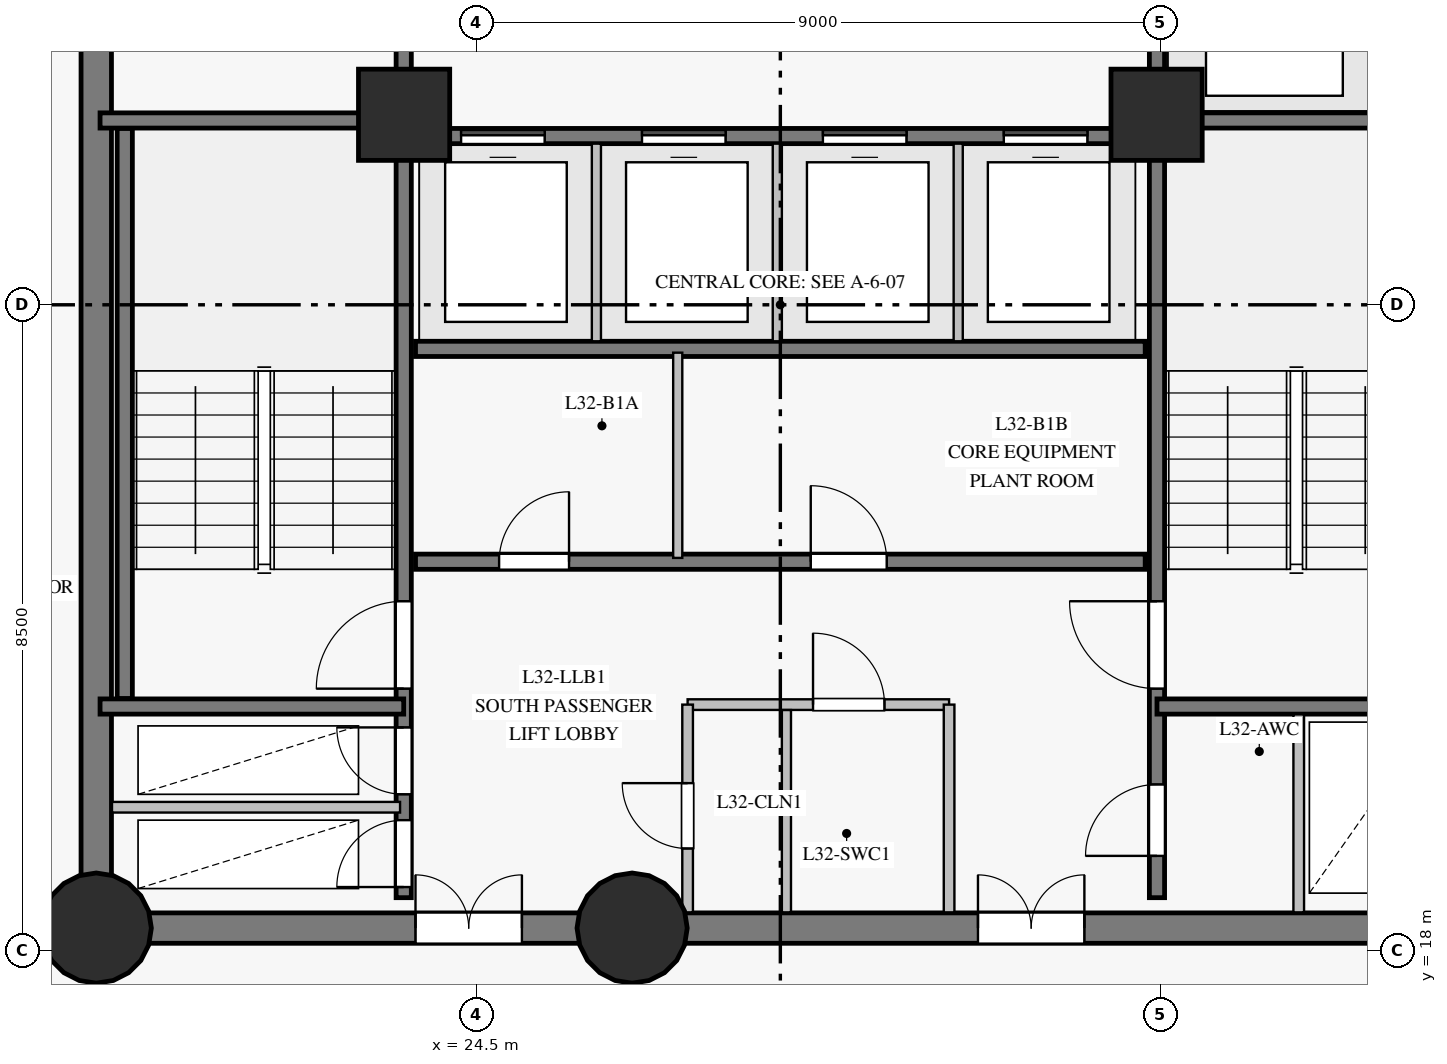
"""IFC4 building model, lengths in metres.
Left out: names, types, materials, properties, quantities, classifications, styles, units other than length and angle.
Written with IfcOpenShell. Run it as: python <this file> out.ifc"""

import sys

from ifc_helpers import new_model, si_unit, direction, frame, frame_2d, origin, origin_with_axes, origin_2d, place, context, subcontext, project, spatial, rectangle, circle, extrude, source, transform, mapped, element, fill, save


model = new_model("IFC4")
c1 = context("Model", 3, precision=1e-05, world=origin(), true_north=direction((0.0, 1.0)))
c2 = subcontext(c1, "Body", "Model", "MODEL_VIEW")
j1 = project(units=[si_unit("LENGTHUNIT", "METRE"), si_unit("PLANEANGLEUNIT", "RADIAN")], contexts=[c1])
p1 = place(None, origin())
s1 = spatial("IfcSite", under=j1, at=p1, CompositionType="ELEMENT")
p2 = place(p1, origin())
s2 = spatial("IfcBuilding", under=s1, at=p2, CompositionType="ELEMENT")
p3 = place(p2, frame((0.0, 0.0, 117.55)))
s3 = spatial("IfcBuildingStorey", under=s2, at=p3, CompositionType="ELEMENT", Elevation=117.55)
p4 = place(p3, frame((19.5, 18.3, 0.0), z_axis=(0.0, 0.0, 1.0), x_axis=(1.0, 0.0, 0.0)))
e1 = element("IfcWall", 1, at=p4, inside=s3, PredefinedType="SHEAR", context=c2, shape_type="SweptSolid", body=[
    extrude(rectangle(XDim=7.05, YDim=0.4, at=frame_2d((3.525, 0.0))), origin(), (0.0, 0.0, 1.0), 2.825),
])
p5 = place(p4, frame((4.2, 0.0, 0.0)))
e2 = element("IfcOpeningElement", 2, at=p5, cuts=e1, PredefinedType="OPENING", context=c2, shape_type="SweptSolid", body=[
    extrude(rectangle(XDim=1.4, YDim=2.2, at=frame_2d((0.7, 1.1))), frame((0.0, 0.21, 0.0), z_axis=(0.0, -1.0, 0.0), x_axis=(1.0, 0.0, 0.0)), (0.0, 0.0, 1.0), 0.42),
])
p6 = place(p3, frame((26.55, 18.3, 0.0), z_axis=(0.0, 0.0, 1.0), x_axis=(1.0, 0.0, 0.0)))
e3 = element("IfcWall", 3, at=p6, inside=s3, PredefinedType="SHEAR", context=c2, shape_type="SweptSolid", body=[
    extrude(rectangle(XDim=10.95, YDim=0.4, at=frame_2d((5.475, 0.0))), origin(), (0.0, 0.0, 1.0), 2.825),
])
p7 = place(p6, frame((4.55, 0.0, 0.0)))
e4 = element("IfcOpeningElement", 4, at=p7, cuts=e3, PredefinedType="OPENING", context=c2, shape_type="SweptSolid", body=[
    extrude(rectangle(XDim=1.4, YDim=2.2, at=frame_2d((0.7, 1.1))), frame((0.0, 0.21, 0.0), z_axis=(0.0, -1.0, 0.0), x_axis=(1.0, 0.0, 0.0)), (0.0, 0.0, 1.0), 0.42),
])
p8 = place(p3, frame((19.5, 34.7, 0.0), z_axis=(0.0, 0.0, 1.0), x_axis=(0.0, -1.0, 0.0)))
e5 = element("IfcWall", 5, at=p8, inside=s3, PredefinedType="SHEAR", context=c2, shape_type="SweptSolid", body=[
    extrude(rectangle(XDim=16.4, YDim=0.4, at=frame_2d((8.2, 0.0))), origin(), (0.0, 0.0, 1.0), 2.825),
])
p9 = place(p8, frame((3.1, 0.0, 0.0)))
e6 = element("IfcOpeningElement", 6, at=p9, cuts=e5, PredefinedType="OPENING", context=c2, shape_type="SweptSolid", body=[
    extrude(rectangle(XDim=1.1, YDim=2.15, at=frame_2d((0.55, 1.075))), frame((0.0, 0.21, 0.0), z_axis=(0.0, -1.0, 0.0), x_axis=(1.0, 0.0, 0.0)), (0.0, 0.0, 1.0), 0.42),
])
m1 = source(origin_with_axes(), c2, "Body", "SweptSolid", [
    extrude(circle(Radius=0.725, at=origin_2d()), origin(), (0.0, 0.0, 1.0), 3.05),
])
for number, where, z_axis, x_axis in (
    (7, (19.5, 18.3, 0.0), (0.0, 0.0, 1.0), (1.0, 0.0, 0.0)),
    (8, (26.55, 18.3, 0.0), (0.0, 0.0, 1.0), (1.0, 0.0, 0.0)),
):
    element("IfcColumn", number, at=place(p3, frame(where, z_axis=z_axis, x_axis=x_axis)), inside=s3, PredefinedType="COLUMN", context=c2, shape_type="MappedRepresentation", body=[
        mapped(m1, transform((0.0, 0.0, 0.0), scale=1.0)),
    ])
m2 = source(origin_with_axes(), c2, "Body", "SweptSolid", [
    extrude(rectangle(XDim=1.2, YDim=1.2, at=origin_2d()), origin(), (0.0, 0.0, 1.0), 3.05),
])
for number, where, z_axis, x_axis in (
    (9, (23.55, 29.0, 0.0), (0.0, 0.0, 1.0), (1.0, 0.0, 0.0)),
    (10, (33.45, 29.0, 0.0), (0.0, 0.0, 1.0), (1.0, 0.0, 0.0)),
):
    element("IfcColumn", number, at=place(p3, frame(where, z_axis=z_axis, x_axis=x_axis)), inside=s3, PredefinedType="COLUMN", context=c2, shape_type="MappedRepresentation", body=[
        mapped(m2, transform((0.0, 0.0, 0.0), scale=1.0)),
    ])
p10 = place(p3, frame((23.545, 18.7, 0.0), z_axis=(0.0, 0.0, 1.0), x_axis=(0.0, 1.0, 0.0)))
e11 = element("IfcWall", 11, at=p10, inside=s3, PredefinedType="SHEAR", context=c2, shape_type="SweptSolid", body=[
    extrude(rectangle(XDim=15.6, YDim=0.2, at=frame_2d((7.8, 0.0))), origin(), (0.0, 0.0, 1.0), 2.825),
])
p11 = place(p10, frame((2.75, 0.0, 0.0)))
e12 = element("IfcOpeningElement", 12, at=p11, cuts=e11, PredefinedType="OPENING", context=c2, shape_type="SweptSolid", body=[
    extrude(rectangle(XDim=1.15, YDim=2.15, at=frame_2d((0.575, 1.075))), frame((0.0, 0.11, 0.0), z_axis=(0.0, -1.0, 0.0), x_axis=(1.0, 0.0, 0.0)), (0.0, 0.0, 1.0), 0.22),
])
p12 = place(p10, frame((0.14, 0.0, 0.0)))
e13 = element("IfcOpeningElement", 13, at=p12, cuts=e11, PredefinedType="OPENING", context=c2, shape_type="SweptSolid", body=[
    extrude(rectangle(XDim=0.88, YDim=2.1, at=frame_2d((0.44, 1.05))), frame((0.0, 0.11, 0.0), z_axis=(0.0, -1.0, 0.0), x_axis=(1.0, 0.0, 0.0)), (0.0, 0.0, 1.0), 0.22),
])
p13 = place(p10, frame((1.36, 0.0, 0.0)))
e14 = element("IfcOpeningElement", 14, at=p13, cuts=e11, PredefinedType="OPENING", context=c2, shape_type="SweptSolid", body=[
    extrude(rectangle(XDim=0.88, YDim=2.1, at=frame_2d((0.44, 1.05))), frame((0.0, 0.11, 0.0), z_axis=(0.0, -1.0, 0.0), x_axis=(1.0, 0.0, 0.0)), (0.0, 0.0, 1.0), 0.22),
])
p14 = place(p10, frame((12.1, 0.0, 0.0)))
e15 = element("IfcOpeningElement", 15, at=p14, cuts=e11, PredefinedType="OPENING", context=c2, shape_type="SweptSolid", body=[
    extrude(rectangle(XDim=1.12, YDim=2.15, at=frame_2d((0.56, 1.075))), frame((0.0, 0.11, 0.0), z_axis=(0.0, -1.0, 0.0), x_axis=(1.0, 0.0, 0.0)), (0.0, 0.0, 1.0), 0.22),
])
p15 = place(p10, frame((14.05, 0.0, 0.0)))
e16 = element("IfcOpeningElement", 16, at=p15, cuts=e11, PredefinedType="OPENING", context=c2, shape_type="SweptSolid", body=[
    extrude(rectangle(XDim=1.12, YDim=2.15, at=frame_2d((0.56, 1.075))), frame((0.0, 0.11, 0.0), z_axis=(0.0, -1.0, 0.0), x_axis=(1.0, 0.0, 0.0)), (0.0, 0.0, 1.0), 0.22),
])
p16 = place(p3, frame((33.455, 18.7, 0.0), z_axis=(0.0, 0.0, 1.0), x_axis=(0.0, 1.0, 0.0)))
e17 = element("IfcWall", 17, at=p16, inside=s3, PredefinedType="SHEAR", context=c2, shape_type="SweptSolid", body=[
    extrude(rectangle(XDim=15.6, YDim=0.2, at=frame_2d((7.8, 0.0))), origin(), (0.0, 0.0, 1.0), 2.825),
])
p17 = place(p16, frame((2.75, 0.0, 0.0)))
e18 = element("IfcOpeningElement", 18, at=p17, cuts=e17, PredefinedType="OPENING", context=c2, shape_type="SweptSolid", body=[
    extrude(rectangle(XDim=1.15, YDim=2.15, at=frame_2d((0.575, 1.075))), frame((0.0, 0.11, 0.0), z_axis=(0.0, -1.0, 0.0), x_axis=(1.0, 0.0, 0.0)), (0.0, 0.0, 1.0), 0.22),
])
p18 = place(p16, frame((0.55, 0.0, 0.0)))
e19 = element("IfcOpeningElement", 19, at=p18, cuts=e17, PredefinedType="OPENING", context=c2, shape_type="SweptSolid", body=[
    extrude(rectangle(XDim=0.94, YDim=2.1, at=frame_2d((0.47, 1.05))), frame((0.0, 0.11, 0.0), z_axis=(0.0, -1.0, 0.0), x_axis=(1.0, 0.0, 0.0)), (0.0, 0.0, 1.0), 0.22),
])
p19 = place(p3, frame((23.7, 23.12, 0.0), z_axis=(0.0, 0.0, 1.0), x_axis=(1.0, 0.0, 0.0)))
e20 = element("IfcWall", 20, at=p19, inside=s3, PredefinedType="SHEAR", context=c2, shape_type="SweptSolid", body=[
    extrude(rectangle(XDim=9.6, YDim=0.2, at=frame_2d((4.8, 0.0))), origin(), (0.0, 0.0, 1.0), 2.825),
])
p20 = place(p19, frame((1.1, 0.0, 0.0)))
e21 = element("IfcOpeningElement", 21, at=p20, cuts=e20, PredefinedType="OPENING", context=c2, shape_type="SweptSolid", body=[
    extrude(rectangle(XDim=0.92, YDim=2.1, at=frame_2d((0.46, 1.05))), frame((0.0, 0.11, 0.0), z_axis=(0.0, -1.0, 0.0), x_axis=(1.0, 0.0, 0.0)), (0.0, 0.0, 1.0), 0.22),
])
p21 = place(p19, frame((5.2, 0.0, 0.0)))
e22 = element("IfcOpeningElement", 22, at=p21, cuts=e20, PredefinedType="OPENING", context=c2, shape_type="SweptSolid", body=[
    extrude(rectangle(XDim=1.0, YDim=2.15, at=frame_2d((0.5, 1.075))), frame((0.0, 0.11, 0.0), z_axis=(0.0, -1.0, 0.0), x_axis=(1.0, 0.0, 0.0)), (0.0, 0.0, 1.0), 0.22),
])
p22 = place(p3, frame((23.7, 25.92, 0.0), z_axis=(0.0, 0.0, 1.0), x_axis=(1.0, 0.0, 0.0)))
e23 = element("IfcWall", 23, at=p22, inside=s3, PredefinedType="SHEAR", context=c2, shape_type="SweptSolid", body=[
    extrude(rectangle(XDim=9.6, YDim=0.2, at=frame_2d((4.8, 0.0))), origin(), (0.0, 0.0, 1.0), 2.825),
])
p23 = place(p3, frame((23.7, 28.72, 0.0), z_axis=(0.0, 0.0, 1.0), x_axis=(1.0, 0.0, 0.0)))
e24 = element("IfcWall", 24, at=p23, inside=s3, PredefinedType="SHEAR", context=c2, shape_type="SweptSolid", body=[
    extrude(rectangle(XDim=9.6, YDim=0.2, at=frame_2d((4.8, 0.0))), origin(), (0.0, 0.0, 1.0), 2.825),
])
p24 = place(p23, frame((0.6, 0.0, 0.0)))
e25 = element("IfcOpeningElement", 25, at=p24, cuts=e24, PredefinedType="OPENING", context=c2, shape_type="SweptSolid", body=[
    extrude(rectangle(XDim=1.1, YDim=2.15, at=frame_2d((0.55, 1.075))), frame((0.0, 0.11, 0.0), z_axis=(0.0, -1.0, 0.0), x_axis=(1.0, 0.0, 0.0)), (0.0, 0.0, 1.0), 0.22),
])
p25 = place(p23, frame((2.98, 0.0, 0.0)))
e26 = element("IfcOpeningElement", 26, at=p25, cuts=e24, PredefinedType="OPENING", context=c2, shape_type="SweptSolid", body=[
    extrude(rectangle(XDim=1.1, YDim=2.15, at=frame_2d((0.55, 1.075))), frame((0.0, 0.11, 0.0), z_axis=(0.0, -1.0, 0.0), x_axis=(1.0, 0.0, 0.0)), (0.0, 0.0, 1.0), 0.22),
])
p26 = place(p23, frame((5.36, 0.0, 0.0)))
e27 = element("IfcOpeningElement", 27, at=p26, cuts=e24, PredefinedType="OPENING", context=c2, shape_type="SweptSolid", body=[
    extrude(rectangle(XDim=1.1, YDim=2.15, at=frame_2d((0.55, 1.075))), frame((0.0, 0.11, 0.0), z_axis=(0.0, -1.0, 0.0), x_axis=(1.0, 0.0, 0.0)), (0.0, 0.0, 1.0), 0.22),
])
p27 = place(p23, frame((7.74, 0.0, 0.0)))
e28 = element("IfcOpeningElement", 28, at=p27, cuts=e24, PredefinedType="OPENING", context=c2, shape_type="SweptSolid", body=[
    extrude(rectangle(XDim=1.1, YDim=2.15, at=frame_2d((0.55, 1.075))), frame((0.0, 0.11, 0.0), z_axis=(0.0, -1.0, 0.0), x_axis=(1.0, 0.0, 0.0)), (0.0, 0.0, 1.0), 0.22),
])
p28 = place(p3, frame((19.875, 21.32, 0.0), z_axis=(0.0, 0.0, 1.0), x_axis=(0.0, 1.0, 0.0)))
e29 = element("IfcWall", 29, at=p28, inside=s3, PredefinedType="SHEAR", context=c2, shape_type="SweptSolid", body=[
    extrude(rectangle(XDim=7.5, YDim=0.2, at=frame_2d((3.75, 0.0))), origin(), (0.0, 0.0, 1.0), 2.825),
])
for number, where, z_axis, x_axis in (
    (30, (33.455, 21.215, 0.0), (0.0, 0.0, 1.0), (1.0, 0.0, 0.0)),
    (31, (33.455, 28.925, 0.0), (0.0, 0.0, 1.0), (1.0, 0.0, 0.0)),
    (32, (19.55, 21.215, 0.0), (0.0, 0.0, 1.0), (1.0, 0.0, 0.0)),
    (33, (19.55, 28.925, 0.0), (0.0, 0.0, 1.0), (1.0, 0.0, 0.0)),
):
    element("IfcWall", number, at=place(p3, frame(where, z_axis=z_axis, x_axis=x_axis)), inside=s3, PredefinedType="SHEAR", context=c2, shape_type="SweptSolid", body=[
        extrude(rectangle(XDim=3.995, YDim=0.2, at=frame_2d((1.998, 0.0))), origin(), (0.0, 0.0, 1.0), 2.825),
    ])
p29 = place(p3, frame((19.707, 19.89, 0.0), z_axis=(0.0, 0.0, 1.0), x_axis=(1.0, 0.0, 0.0)))
e34 = element("IfcWall", 34, at=p29, inside=s3, PredefinedType="PARTITIONING", context=c2, shape_type="SweptSolid", body=[
    extrude(rectangle(XDim=3.79, YDim=0.14, at=frame_2d((1.895, 0.0))), origin(), (0.0, 0.0, 1.0), 2.825),
])
p30 = place(p3, frame((27.28, 21.24, 0.0), z_axis=(0.0, 0.0, 1.0), x_axis=(1.0, 0.0, 0.0)))
e35 = element("IfcWall", 35, at=p30, inside=s3, PredefinedType="PARTITIONING", context=c2, shape_type="SweptSolid", body=[
    extrude(rectangle(XDim=3.44, YDim=0.14, at=frame_2d((1.72, 0.0))), origin(), (0.0, 0.0, 1.0), 2.825),
])
p31 = place(p30, frame((1.65, 0.0, 0.0)))
e36 = element("IfcOpeningElement", 36, at=p31, cuts=e35, PredefinedType="OPENING", context=c2, shape_type="SweptSolid", body=[
    extrude(rectangle(XDim=0.94, YDim=2.1, at=frame_2d((0.47, 1.05))), frame((0.0, 0.08, 0.0), z_axis=(0.0, -1.0, 0.0), x_axis=(1.0, 0.0, 0.0)), (0.0, 0.0, 1.0), 0.16),
])
p32 = place(p3, frame((27.15, 23.17, 0.0), z_axis=(0.0, 0.0, 1.0), x_axis=(0.0, 1.0, 0.0)))
e37 = element("IfcWall", 37, at=p32, inside=s3, PredefinedType="PARTITIONING", context=c2, shape_type="SweptSolid", body=[
    extrude(rectangle(XDim=2.7, YDim=0.12, at=frame_2d((1.35, 0.0))), origin(), (0.0, 0.0, 1.0), 2.825),
])
p33 = place(p3, frame((27.28, 18.507, 0.0), z_axis=(0.0, 0.0, 1.0), x_axis=(0.0, 1.0, 0.0)))
e38 = element("IfcWall", 38, at=p33, inside=s3, PredefinedType="PARTITIONING", context=c2, shape_type="SweptSolid", body=[
    extrude(rectangle(XDim=2.733, YDim=0.14, at=frame_2d((1.366, 0.0))), origin(), (0.0, 0.0, 1.0), 2.825),
])
p34 = place(p33, frame((0.84, 0.0, 0.0)))
e39 = element("IfcOpeningElement", 39, at=p34, cuts=e38, PredefinedType="OPENING", context=c2, shape_type="SweptSolid", body=[
    extrude(rectangle(XDim=0.86, YDim=2.1, at=frame_2d((0.43, 1.05))), frame((0.0, 0.08, 0.0), z_axis=(0.0, -1.0, 0.0), x_axis=(1.0, 0.0, 0.0)), (0.0, 0.0, 1.0), 0.16),
])
p35 = place(p3, frame((30.72, 18.507, 0.0), z_axis=(0.0, 0.0, 1.0), x_axis=(0.0, 1.0, 0.0)))
e40 = element("IfcWall", 40, at=p35, inside=s3, PredefinedType="PARTITIONING", context=c2, shape_type="SweptSolid", body=[
    extrude(rectangle(XDim=2.733, YDim=0.14, at=frame_2d((1.366, 0.0))), origin(), (0.0, 0.0, 1.0), 2.825),
])
for number, where, z_axis, x_axis in (
    (41, (26.08, 26.02, 0.0), (0.0, 0.0, 1.0), (0.0, 1.0, 0.0)),
    (42, (28.46, 26.02, 0.0), (0.0, 0.0, 1.0), (0.0, 1.0, 0.0)),
    (43, (30.84, 26.02, 0.0), (0.0, 0.0, 1.0), (0.0, 1.0, 0.0)),
):
    element("IfcWall", number, at=place(p3, frame(where, z_axis=z_axis, x_axis=x_axis)), inside=s3, PredefinedType="PARTITIONING", context=c2, shape_type="SweptSolid", body=[
        extrude(rectangle(XDim=2.6, YDim=0.12, at=frame_2d((1.3, 0.0))), origin(), (0.0, 0.0, 1.0), 2.825),
    ])
p36 = place(p3, frame((28.58, 18.507, 0.0), z_axis=(0.0, 0.0, 1.0), x_axis=(0.0, 1.0, 0.0)))
e44 = element("IfcWall", 44, at=p36, inside=s3, PredefinedType="PARTITIONING", context=c2, shape_type="SweptSolid", body=[
    extrude(rectangle(XDim=2.662, YDim=0.12, at=frame_2d((1.331, 0.0))), origin(), (0.0, 0.0, 1.0), 2.825),
])
p37 = place(p3, frame((35.32, 18.507, 0.0), z_axis=(0.0, 0.0, 1.0), x_axis=(0.0, 1.0, 0.0)))
e45 = element("IfcWall", 45, at=p37, inside=s3, PredefinedType="PARTITIONING", context=c2, shape_type="SweptSolid", body=[
    extrude(rectangle(XDim=2.604, YDim=0.14, at=frame_2d((1.302, 0.0))), origin(), (0.0, 0.0, 1.0), 2.825),
])
m3 = source(origin_with_axes(), c2, "Body", "SweptSolid", [
    extrude(rectangle(XDim=1.15, YDim=2.15, at=frame_2d((0.575, 1.075))), frame((0.0, 0.025, 0.0), z_axis=(0.0, -1.0, 0.0), x_axis=(1.0, 0.0, 0.0)), (0.0, 0.0, 1.0), 0.05),
])
p38 = place(p11, origin())
e46 = element("IfcDoor", 46, at=p38, inside=s3, OperationType="SINGLE_SWING_LEFT", PredefinedType="DOOR", context=c2, shape_type="MappedRepresentation", body=[
    mapped(m3, transform((0.0, 0.0, 0.0), scale=1.0)),
])
fill(e12, e46)
p39 = place(p17, origin())
e47 = element("IfcDoor", 47, at=p39, inside=s3, OperationType="SINGLE_SWING_RIGHT", PredefinedType="DOOR", context=c2, shape_type="MappedRepresentation", body=[
    mapped(m3, transform((0.0, 0.0, 0.0), scale=1.0)),
])
fill(e18, e47)
m4 = source(origin_with_axes(), c2, "Body", "SweptSolid", [
    extrude(rectangle(XDim=0.88, YDim=2.1, at=frame_2d((0.44, 1.05))), frame((0.0, 0.025, 0.0), z_axis=(0.0, -1.0, 0.0), x_axis=(1.0, 0.0, 0.0)), (0.0, 0.0, 1.0), 0.05),
])
p40 = place(p12, origin())
e48 = element("IfcDoor", 48, at=p40, inside=s3, OperationType="SINGLE_SWING_LEFT", PredefinedType="DOOR", context=c2, shape_type="MappedRepresentation", body=[
    mapped(m4, transform((0.0, 0.0, 0.0), scale=1.0)),
])
fill(e13, e48)
p41 = place(p13, origin())
e49 = element("IfcDoor", 49, at=p41, inside=s3, OperationType="SINGLE_SWING_RIGHT", PredefinedType="DOOR", context=c2, shape_type="MappedRepresentation", body=[
    mapped(m4, transform((0.0, 0.0, 0.0), scale=1.0)),
])
fill(e14, e49)
m5 = source(origin_with_axes(), c2, "Body", "SweptSolid", [
    extrude(rectangle(XDim=1.4, YDim=2.2, at=frame_2d((0.7, 1.1))), frame((0.0, 0.025, 0.0), z_axis=(0.0, -1.0, 0.0), x_axis=(1.0, 0.0, 0.0)), (0.0, 0.0, 1.0), 0.05),
])
p42 = place(p5, origin())
e50 = element("IfcDoor", 50, at=p42, inside=s3, OperationType="DOUBLE_DOOR_SINGLE_SWING", PredefinedType="DOOR", context=c2, shape_type="MappedRepresentation", body=[
    mapped(m5, transform((0.0, 0.0, 0.0), scale=1.0)),
])
fill(e2, e50)
p43 = place(p7, origin())
e51 = element("IfcDoor", 51, at=p43, inside=s3, OperationType="DOUBLE_DOOR_SINGLE_SWING", PredefinedType="DOOR", context=c2, shape_type="MappedRepresentation", body=[
    mapped(m5, transform((0.0, 0.0, 0.0), scale=1.0)),
])
fill(e4, e51)
m6 = source(origin_with_axes(), c2, "Body", "SweptSolid", [
    extrude(rectangle(XDim=0.94, YDim=2.1, at=frame_2d((0.47, 1.05))), frame((0.0, 0.025, 0.0), z_axis=(0.0, -1.0, 0.0), x_axis=(1.0, 0.0, 0.0)), (0.0, 0.0, 1.0), 0.05),
])
p44 = place(p18, origin())
e52 = element("IfcDoor", 52, at=p44, inside=s3, OperationType="SINGLE_SWING_LEFT", PredefinedType="DOOR", context=c2, shape_type="MappedRepresentation", body=[
    mapped(m6, transform((0.0, 0.0, 0.0), scale=1.0)),
])
fill(e19, e52)
m7 = source(origin_with_axes(), c2, "Body", "SweptSolid", [
    extrude(rectangle(XDim=0.86, YDim=2.1, at=frame_2d((0.43, 1.05))), frame((0.0, 0.025, 0.0), z_axis=(0.0, -1.0, 0.0), x_axis=(1.0, 0.0, 0.0)), (0.0, 0.0, 1.0), 0.05),
])
p45 = place(p34, origin())
e53 = element("IfcDoor", 53, at=p45, inside=s3, OperationType="SINGLE_SWING_RIGHT", PredefinedType="DOOR", context=c2, shape_type="MappedRepresentation", body=[
    mapped(m7, transform((0.0, 0.0, 0.0), scale=1.0)),
])
fill(e39, e53)
p46 = place(p31, origin())
e54 = element("IfcDoor", 54, at=p46, inside=s3, OperationType="SINGLE_SWING_LEFT", PredefinedType="DOOR", context=c2, shape_type="MappedRepresentation", body=[
    mapped(m6, transform((0.0, 0.0, 0.0), scale=1.0)),
])
fill(e36, e54)
m8 = source(origin_with_axes(), c2, "Body", "SweptSolid", [
    extrude(rectangle(XDim=0.92, YDim=2.1, at=frame_2d((0.46, 1.05))), frame((0.0, 0.025, 0.0), z_axis=(0.0, -1.0, 0.0), x_axis=(1.0, 0.0, 0.0)), (0.0, 0.0, 1.0), 0.05),
])
p47 = place(p20, origin())
e55 = element("IfcDoor", 55, at=p47, inside=s3, OperationType="SINGLE_SWING_RIGHT", PredefinedType="DOOR", context=c2, shape_type="MappedRepresentation", body=[
    mapped(m8, transform((0.0, 0.0, 0.0), scale=1.0)),
])
fill(e21, e55)
m9 = source(origin_with_axes(), c2, "Body", "SweptSolid", [
    extrude(rectangle(XDim=1.0, YDim=2.15, at=frame_2d((0.5, 1.075))), frame((0.0, 0.025, 0.0), z_axis=(0.0, -1.0, 0.0), x_axis=(1.0, 0.0, 0.0)), (0.0, 0.0, 1.0), 0.05),
])
p48 = place(p21, origin())
e56 = element("IfcDoor", 56, at=p48, inside=s3, OperationType="SINGLE_SWING_LEFT", PredefinedType="DOOR", context=c2, shape_type="MappedRepresentation", body=[
    mapped(m9, transform((0.0, 0.0, 0.0), scale=1.0)),
])
fill(e22, e56)
m10 = source(origin_with_axes(), c2, "Body", "SweptSolid", [
    extrude(rectangle(XDim=1.1, YDim=2.15, at=frame_2d((0.55, 1.075))), frame((0.0, 0.025, 0.0), z_axis=(0.0, -1.0, 0.0), x_axis=(1.0, 0.0, 0.0)), (0.0, 0.0, 1.0), 0.05),
])
p49 = place(p24, origin())
e57 = element("IfcDoor", 57, at=p49, inside=s3, OperationType="SLIDING_TO_LEFT", PredefinedType="DOOR", context=c2, shape_type="MappedRepresentation", body=[
    mapped(m10, transform((0.0, 0.0, 0.0), scale=1.0)),
])
fill(e25, e57)
p50 = place(p25, origin())
e58 = element("IfcDoor", 58, at=p50, inside=s3, OperationType="SLIDING_TO_RIGHT", PredefinedType="DOOR", context=c2, shape_type="MappedRepresentation", body=[
    mapped(m10, transform((0.0, 0.0, 0.0), scale=1.0)),
])
fill(e26, e58)
p51 = place(p26, origin())
e59 = element("IfcDoor", 59, at=p51, inside=s3, OperationType="SLIDING_TO_LEFT", PredefinedType="DOOR", context=c2, shape_type="MappedRepresentation", body=[
    mapped(m10, transform((0.0, 0.0, 0.0), scale=1.0)),
])
fill(e27, e59)
p52 = place(p27, origin())
e60 = element("IfcDoor", 60, at=p52, inside=s3, OperationType="SLIDING_TO_RIGHT", PredefinedType="DOOR", context=c2, shape_type="MappedRepresentation", body=[
    mapped(m10, transform((0.0, 0.0, 0.0), scale=1.0)),
])
fill(e28, e60)
save(model, sys.argv[1])
